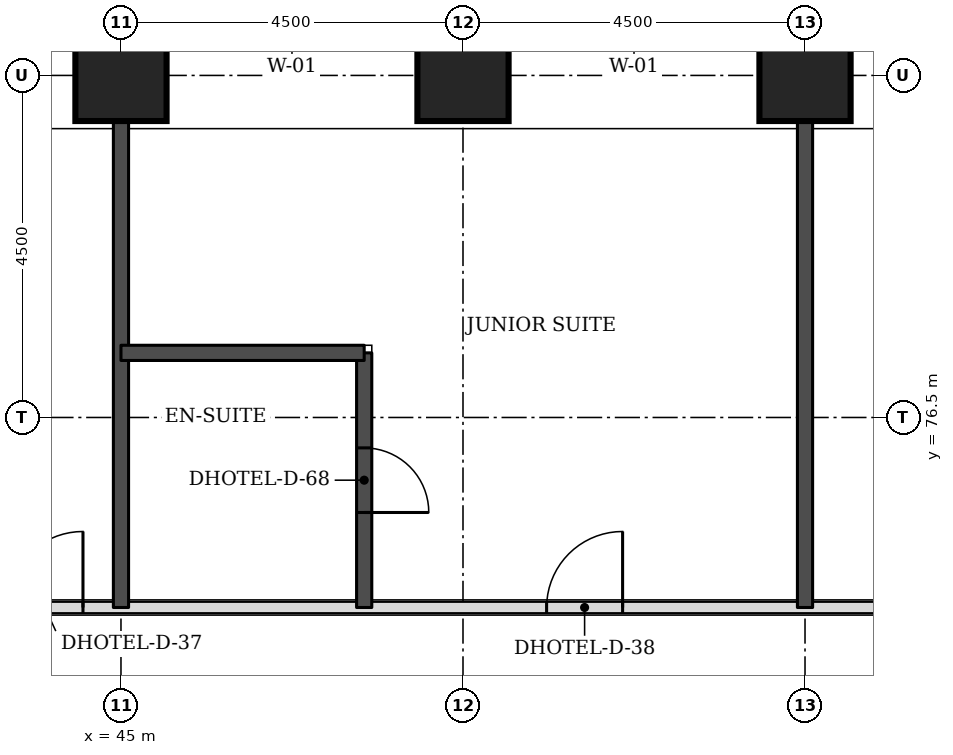
"""IFC4 building model, lengths in metres.
Left out: names, types, materials, properties, quantities, classifications, styles, units other than length and angle.
Written with IfcOpenShell. Run it as: python <this file> out.ifc"""

import sys

from ifc_helpers import new_model, si_unit, direction, frame, frame_2d, origin, origin_2d, place, context, subcontext, project, spatial, rectangle, extrude, element, fill, save


model = new_model("IFC4")
c1 = context("Model", 3, precision=1e-05, world=origin(), true_north=direction((0.0, 1.0)))
c2 = subcontext(c1, "Body", "Model", "MODEL_VIEW")
j1 = project(units=[si_unit("LENGTHUNIT", "METRE"), si_unit("PLANEANGLEUNIT", "RADIAN")], contexts=[c1])
p1 = place(None, origin())
s1 = spatial("IfcSite", under=j1, at=p1, CompositionType="ELEMENT")
p2 = place(p1, origin())
s2 = spatial("IfcBuilding", under=s1, at=p2, CompositionType="ELEMENT")
p3 = place(p2, frame((0.0, 0.0, 36.3)))
s3 = spatial("IfcBuildingStorey", under=s2, at=p3, CompositionType="ELEMENT", Elevation=36.3)
for number, where, z_axis, x_axis in (
    (1, (45.0, 81.0, 0.0), (0.0, 0.0, 1.0), (1.0, 0.0, 0.0)),
    (2, (49.5, 81.0, 0.0), (0.0, 0.0, 1.0), (1.0, 0.0, 0.0)),
    (3, (54.0, 81.0, 0.0), (0.0, 0.0, 1.0), (1.0, 0.0, 0.0)),
):
    element("IfcColumn", number, at=place(p3, frame(where, z_axis=z_axis, x_axis=x_axis)), inside=s3, PredefinedType="COLUMN", context=c2, shape_type="SweptSolid", body=[
        extrude(rectangle(XDim=1.2, YDim=1.2, at=origin_2d()), origin(), (0.0, 0.0, 1.0), 3.3),
    ])
p4 = place(p3, frame((43.0, 74.0, 0.0), z_axis=(0.0, 0.0, 1.0), x_axis=(1.0, 0.0, 0.0)))
e4 = element("IfcWall", 4, at=p4, inside=s3, PredefinedType="PARTITIONING", context=c2, shape_type="SweptSolid", body=[
    extrude(rectangle(XDim=26.5, YDim=0.15, at=frame_2d((13.25, 0.0))), origin(), (0.0, 0.0, 1.0), 3.08),
])
p5 = place(p4, frame((7.6, 0.0, 0.0)))
e5 = element("IfcOpeningElement", 5, at=p5, cuts=e4, PredefinedType="OPENING", context=c2, shape_type="SweptSolid", body=[
    extrude(rectangle(XDim=1.0, YDim=2.1, at=frame_2d((0.5, 1.05))), frame((0.0, 0.085, 0.0), z_axis=(0.0, -1.0, 0.0), x_axis=(1.0, 0.0, 0.0)), (0.0, 0.0, 1.0), 0.17),
])
p6 = place(p4, frame((13.65, 0.0, 0.0)))
e6 = element("IfcOpeningElement", 6, at=p6, cuts=e4, PredefinedType="OPENING", context=c2, shape_type="SweptSolid", body=[
    extrude(rectangle(XDim=1.0, YDim=2.1, at=frame_2d((0.5, 1.05))), frame((0.0, 0.085, 0.0), z_axis=(0.0, -1.0, 0.0), x_axis=(1.0, 0.0, 0.0)), (0.0, 0.0, 1.0), 0.17),
])
p7 = place(p4, frame((23.05, 0.0, 0.0)))
e7 = element("IfcOpeningElement", 7, at=p7, cuts=e4, PredefinedType="OPENING", context=c2, shape_type="SweptSolid", body=[
    extrude(rectangle(XDim=1.0, YDim=2.1, at=frame_2d((0.5, 1.05))), frame((0.0, 0.085, 0.0), z_axis=(0.0, -1.0, 0.0), x_axis=(1.0, 0.0, 0.0)), (0.0, 0.0, 1.0), 0.17),
])
p8 = place(p4, frame((0.5, 0.0, 0.0)))
e8 = element("IfcOpeningElement", 8, at=p8, cuts=e4, PredefinedType="OPENING", context=c2, shape_type="SweptSolid", body=[
    extrude(rectangle(XDim=1.0, YDim=2.1, at=frame_2d((0.5, 1.05))), frame((0.0, 0.085, 0.0), z_axis=(0.0, -1.0, 0.0), x_axis=(1.0, 0.0, 0.0)), (0.0, 0.0, 1.0), 0.17),
])
p9 = place(p4, frame((25.0, 0.0, 0.0)))
e9 = element("IfcOpeningElement", 9, at=p9, cuts=e4, PredefinedType="OPENING", context=c2, shape_type="SweptSolid", body=[
    extrude(rectangle(XDim=1.0, YDim=2.1, at=frame_2d((0.5, 1.05))), frame((0.0, 0.085, 0.0), z_axis=(0.0, -1.0, 0.0), x_axis=(1.0, 0.0, 0.0)), (0.0, 0.0, 1.0), 0.17),
])
p10 = place(p3, frame((45.0, 74.0, 0.0), z_axis=(0.0, 0.0, 1.0), x_axis=(0.0, 1.0, 0.0)))
e10 = element("IfcWall", 10, at=p10, inside=s3, PredefinedType="SOLIDWALL", context=c2, shape_type="SweptSolid", body=[
    extrude(rectangle(XDim=6.4, YDim=0.2, at=frame_2d((3.2, 0.0))), origin(), (0.0, 0.0, 1.0), 3.08),
])
p11 = place(p3, frame((48.2, 74.0, 0.0), z_axis=(0.0, 0.0, 1.0), x_axis=(0.0, 1.0, 0.0)))
e11 = element("IfcWall", 11, at=p11, inside=s3, PredefinedType="SOLIDWALL", context=c2, shape_type="SweptSolid", body=[
    extrude(rectangle(XDim=3.35, YDim=0.2, at=frame_2d((1.675, 0.0))), origin(), (0.0, 0.0, 1.0), 3.08),
])
p12 = place(p11, frame((1.25, 0.0, 0.0)))
e12 = element("IfcOpeningElement", 12, at=p12, cuts=e11, PredefinedType="OPENING", context=c2, shape_type="SweptSolid", body=[
    extrude(rectangle(XDim=0.85, YDim=2.1, at=frame_2d((0.425, 1.05))), frame((0.0, 0.11, 0.0), z_axis=(0.0, -1.0, 0.0), x_axis=(1.0, 0.0, 0.0)), (0.0, 0.0, 1.0), 0.22),
])
p13 = place(p3, frame((54.0, 74.0, 0.0), z_axis=(0.0, 0.0, 1.0), x_axis=(0.0, 1.0, 0.0)))
e13 = element("IfcWall", 13, at=p13, inside=s3, PredefinedType="SOLIDWALL", context=c2, shape_type="SweptSolid", body=[
    extrude(rectangle(XDim=6.4, YDim=0.2, at=frame_2d((3.2, 0.0))), origin(), (0.0, 0.0, 1.0), 3.08),
])
p14 = place(p3, frame((45.0, 77.35, 0.0), z_axis=(0.0, 0.0, 1.0), x_axis=(1.0, 0.0, 0.0)))
e14 = element("IfcWall", 14, at=p14, inside=s3, PredefinedType="SOLIDWALL", context=c2, shape_type="SweptSolid", body=[
    extrude(rectangle(XDim=3.2, YDim=0.2, at=frame_2d((1.6, 0.0))), origin(), (0.0, 0.0, 1.0), 3.08),
])
p15 = place(p5, origin())
e15 = element("IfcDoor", 15, at=p15, inside=s3, OperationType="SINGLE_SWING_RIGHT", PredefinedType="DOOR", context=c2, shape_type="SweptSolid", body=[
    extrude(rectangle(XDim=1.0, YDim=2.1, at=frame_2d((0.5, 1.05))), frame((0.0, 0.025, 0.0), z_axis=(0.0, -1.0, 0.0), x_axis=(1.0, 0.0, 0.0)), (0.0, 0.0, 1.0), 0.05),
])
fill(e5, e15)
p16 = place(p12, frame((0.85, 0.0, 0.0), z_axis=(0.0, 0.0, 1.0), x_axis=(-1.0, 0.0, 0.0)))
e16 = element("IfcDoor", 16, at=p16, inside=s3, OperationType="SINGLE_SWING_RIGHT", PredefinedType="DOOR", context=c2, shape_type="SweptSolid", body=[
    extrude(rectangle(XDim=0.85, YDim=2.1, at=frame_2d((0.425, 1.05))), frame((0.0, 0.025, 0.0), z_axis=(0.0, -1.0, 0.0), x_axis=(1.0, 0.0, 0.0)), (0.0, 0.0, 1.0), 0.05),
])
fill(e12, e16)
p17 = place(p8, origin())
e17 = element("IfcDoor", 17, at=p17, inside=s3, OperationType="SINGLE_SWING_RIGHT", PredefinedType="DOOR", context=c2, shape_type="SweptSolid", body=[
    extrude(rectangle(XDim=1.0, YDim=2.1, at=frame_2d((0.5, 1.05))), frame((0.0, 0.025, 0.0), z_axis=(0.0, -1.0, 0.0), x_axis=(1.0, 0.0, 0.0)), (0.0, 0.0, 1.0), 0.05),
])
fill(e8, e17)
save(model, sys.argv[1])
